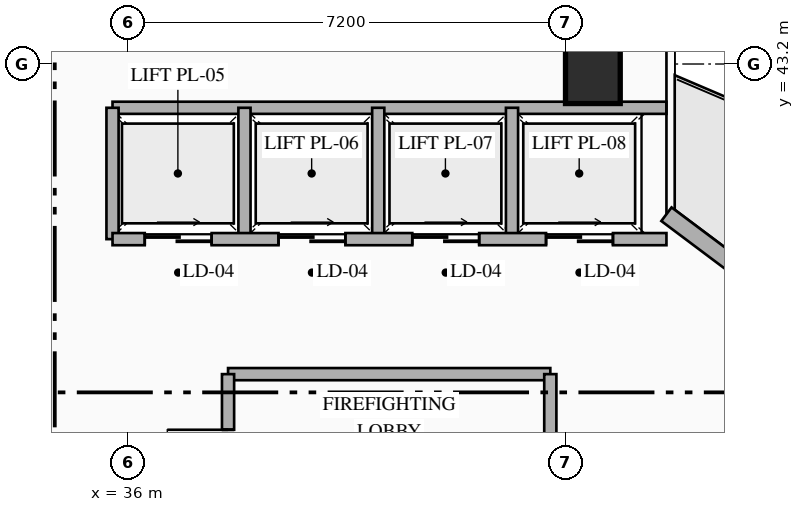
"""IFC4 building model, lengths in metres.
Left out: names, types, materials, properties, quantities, classifications, styles, units other than length and angle.
Written with IfcOpenShell. Run it as: python <this file> out.ifc"""

import sys

from ifc_helpers import new_model, si_unit, direction, frame, frame_2d, origin, origin_2d, place, context, subcontext, project, spatial, rectangle, extrude, element, fill, save


model = new_model("IFC4")
c1 = context("Model", 3, precision=1e-05, world=origin(), true_north=direction((0.0, 1.0)))
c2 = subcontext(c1, "Body", "Model", "MODEL_VIEW")
j1 = project(units=[si_unit("LENGTHUNIT", "METRE"), si_unit("PLANEANGLEUNIT", "RADIAN")], contexts=[c1])
p1 = place(None, origin())
s1 = spatial("IfcSite", under=j1, at=p1, CompositionType="ELEMENT")
p2 = place(p1, origin())
s2 = spatial("IfcBuilding", under=s1, at=p2, CompositionType="ELEMENT")
p3 = place(p2, frame((0.0, 0.0, 130.05)))
s3 = spatial("IfcBuildingStorey", under=s2, at=p3, CompositionType="ELEMENT", Elevation=130.05)
p4 = place(p3, frame((43.65, 43.0, 0.0), z_axis=(0.0, 0.0, 1.0), x_axis=(1.0, 0.0, 0.0)))
e1 = element("IfcColumn", 1, at=p4, inside=s3, PredefinedType="COLUMN", context=c2, shape_type="SweptSolid", body=[
    extrude(rectangle(XDim=0.9, YDim=0.9, at=origin_2d()), origin(), (0.0, 0.0, 1.0), 4.8),
])
p5 = place(p3, frame((44.86, 40.73, 0.0), z_axis=(0.0, 0.0, 1.0), x_axis=(0.800007624502, -0.599989833863, 0.0)))
e2 = element("IfcWall", 2, at=p5, inside=s3, PredefinedType="STANDARD", context=c2, shape_type="SweptSolid", body=[
    extrude(rectangle(XDim=19.212, YDim=0.28, at=frame_2d((9.606, 0.0))), origin(), (0.0, 0.0, 1.0), 4.55),
])
p6 = place(p5, frame((1.755, 0.0, 0.0)))
e3 = element("IfcOpeningElement", 3, at=p6, cuts=e2, PredefinedType="OPENING", context=c2, shape_type="SweptSolid", body=[
    extrude(rectangle(XDim=1.1, YDim=2.2, at=frame_2d((0.55, 1.1))), frame((0.0, 0.15, 0.0), z_axis=(0.0, -1.0, 0.0), x_axis=(1.0, 0.0, 0.0)), (0.0, 0.0, 1.0), 0.3),
])
p7 = place(p5, frame((13.509, 0.0, 0.85)))
e4 = element("IfcOpeningElement", 4, at=p7, cuts=e2, PredefinedType="OPENING", context=c2, shape_type="SweptSolid", body=[
    extrude(rectangle(XDim=1.8, YDim=2.1, at=frame_2d((0.9, 1.05))), frame((0.0, 0.15, 0.0), z_axis=(0.0, -1.0, 0.0), x_axis=(1.0, 0.0, 0.0)), (0.0, 0.0, 1.0), 0.3),
])
p8 = place(p3, frame((37.65, 38.1, 0.0), z_axis=(0.0, 0.0, 1.0), x_axis=(1.0, 0.0, 0.0)))
e5 = element("IfcWall", 5, at=p8, inside=s3, PredefinedType="STANDARD", context=c2, shape_type="SweptSolid", body=[
    extrude(rectangle(XDim=5.3, YDim=0.2, at=frame_2d((2.65, 0.0))), origin(), (0.0, 0.0, 1.0), 4.55),
])
p9 = place(p3, frame((42.95, 35.27, 0.0), z_axis=(0.0, 0.0, 1.0), x_axis=(0.0, 1.0, 0.0)))
e6 = element("IfcWall", 6, at=p9, inside=s3, PredefinedType="STANDARD", context=c2, shape_type="SweptSolid", body=[
    extrude(rectangle(XDim=2.83, YDim=0.2, at=frame_2d((1.415, 0.0))), origin(), (0.0, 0.0, 1.0), 4.55),
])
p10 = place(p3, frame((37.65, 35.27, 0.0), z_axis=(0.0, 0.0, 1.0), x_axis=(0.0, 1.0, 0.0)))
e7 = element("IfcWall", 7, at=p10, inside=s3, PredefinedType="STANDARD", context=c2, shape_type="SweptSolid", body=[
    extrude(rectangle(XDim=2.83, YDim=0.2, at=frame_2d((1.415, 0.0))), origin(), (0.0, 0.0, 1.0), 4.55),
])
p11 = place(p10, frame((0.915, 0.0, 0.0)))
e8 = element("IfcOpeningElement", 8, at=p11, cuts=e7, PredefinedType="OPENING", context=c2, shape_type="SweptSolid", body=[
    extrude(rectangle(XDim=1.0, YDim=2.2, at=frame_2d((0.5, 1.1))), frame((0.0, 0.11, 0.0), z_axis=(0.0, -1.0, 0.0), x_axis=(1.0, 0.0, 0.0)), (0.0, 0.0, 1.0), 0.22),
])
p12 = place(p3, frame((35.75, 42.48, 0.0), z_axis=(0.0, 0.0, 1.0), x_axis=(1.0, 0.0, 0.0)))
e9 = element("IfcWall", 9, at=p12, inside=s3, PredefinedType="STANDARD", context=c2, shape_type="SweptSolid", body=[
    extrude(rectangle(XDim=9.11, YDim=0.2, at=frame_2d((4.555, 0.0))), origin(), (0.0, 0.0, 1.0), 4.55),
])
for number, where, z_axis, x_axis in (
    (10, (35.75, 40.32, 0.0), (0.0, 0.0, 1.0), (0.0, 1.0, 0.0)),
    (11, (37.92, 40.32, 0.0), (0.0, 0.0, 1.0), (0.0, 1.0, 0.0)),
    (12, (40.12, 40.32, 0.0), (0.0, 0.0, 1.0), (0.0, 1.0, 0.0)),
    (13, (42.32, 40.32, 0.0), (0.0, 0.0, 1.0), (0.0, 1.0, 0.0)),
):
    element("IfcWall", number, at=place(p3, frame(where, z_axis=z_axis, x_axis=x_axis)), inside=s3, PredefinedType="STANDARD", context=c2, shape_type="SweptSolid", body=[
        extrude(rectangle(XDim=2.16, YDim=0.2, at=frame_2d((1.08, 0.0))), origin(), (0.0, 0.0, 1.0), 4.55),
    ])
p13 = place(p3, frame((35.75, 40.32, 0.0), z_axis=(0.0, 0.0, 1.0), x_axis=(1.0, 0.0, 0.0)))
e14 = element("IfcWall", 14, at=p13, inside=s3, PredefinedType="STANDARD", context=c2, shape_type="SweptSolid", body=[
    extrude(rectangle(XDim=9.11, YDim=0.2, at=frame_2d((4.555, 0.0))), origin(), (0.0, 0.0, 1.0), 4.55),
])
p14 = place(p13, frame((0.53, 0.0, 0.0)))
e15 = element("IfcOpeningElement", 15, at=p14, cuts=e14, PredefinedType="OPENING", context=c2, shape_type="SweptSolid", body=[
    extrude(rectangle(XDim=1.1, YDim=2.18, at=frame_2d((0.55, 1.09))), frame((0.0, 0.11, 0.0), z_axis=(0.0, -1.0, 0.0), x_axis=(1.0, 0.0, 0.0)), (0.0, 0.0, 1.0), 0.22),
])
p15 = place(p13, frame((2.73, 0.0, 0.0)))
e16 = element("IfcOpeningElement", 16, at=p15, cuts=e14, PredefinedType="OPENING", context=c2, shape_type="SweptSolid", body=[
    extrude(rectangle(XDim=1.1, YDim=2.18, at=frame_2d((0.55, 1.09))), frame((0.0, 0.11, 0.0), z_axis=(0.0, -1.0, 0.0), x_axis=(1.0, 0.0, 0.0)), (0.0, 0.0, 1.0), 0.22),
])
p16 = place(p13, frame((4.93, 0.0, 0.0)))
e17 = element("IfcOpeningElement", 17, at=p16, cuts=e14, PredefinedType="OPENING", context=c2, shape_type="SweptSolid", body=[
    extrude(rectangle(XDim=1.1, YDim=2.18, at=frame_2d((0.55, 1.09))), frame((0.0, 0.11, 0.0), z_axis=(0.0, -1.0, 0.0), x_axis=(1.0, 0.0, 0.0)), (0.0, 0.0, 1.0), 0.22),
])
p17 = place(p13, frame((7.13, 0.0, 0.0)))
e18 = element("IfcOpeningElement", 18, at=p17, cuts=e14, PredefinedType="OPENING", context=c2, shape_type="SweptSolid", body=[
    extrude(rectangle(XDim=1.1, YDim=2.18, at=frame_2d((0.55, 1.09))), frame((0.0, 0.11, 0.0), z_axis=(0.0, -1.0, 0.0), x_axis=(1.0, 0.0, 0.0)), (0.0, 0.0, 1.0), 0.22),
])
p18 = place(p3, frame((43.63, 31.973, 0.0), z_axis=(0.0, 0.0, 1.0), x_axis=(0.599975099311, 0.800018674911, 0.0)))
e19 = element("IfcWall", 19, at=p18, inside=s3, PredefinedType="PARTITIONING", context=c2, shape_type="SweptSolid", body=[
    extrude(rectangle(XDim=7.844, YDim=0.15, at=frame_2d((3.922, 0.0))), origin(), (0.0, 0.0, 1.0), 4.55),
])
p19 = place(p11, origin())
e20 = element("IfcDoor", 20, at=p19, inside=s3, OperationType="SINGLE_SWING_RIGHT", PredefinedType="DOOR", context=c2, shape_type="SweptSolid", body=[
    extrude(rectangle(XDim=1.0, YDim=2.2, at=frame_2d((0.5, 1.1))), frame((0.0, 0.025, 0.0), z_axis=(0.0, -1.0, 0.0), x_axis=(1.0, 0.0, 0.0)), (0.0, 0.0, 1.0), 0.05),
])
fill(e8, e20)
p20 = place(p14, origin())
e21 = element("IfcDoor", 21, at=p20, inside=s3, OperationType="SLIDING_TO_RIGHT", PredefinedType="USERDEFINED", context=c2, shape_type="SweptSolid", body=[
    extrude(rectangle(XDim=1.1, YDim=2.18, at=frame_2d((0.55, 1.09))), frame((0.0, 0.025, 0.0), z_axis=(0.0, -1.0, 0.0), x_axis=(1.0, 0.0, 0.0)), (0.0, 0.0, 1.0), 0.05),
])
fill(e15, e21)
p21 = place(p15, origin())
e22 = element("IfcDoor", 22, at=p21, inside=s3, OperationType="SLIDING_TO_RIGHT", PredefinedType="USERDEFINED", context=c2, shape_type="SweptSolid", body=[
    extrude(rectangle(XDim=1.1, YDim=2.18, at=frame_2d((0.55, 1.09))), frame((0.0, 0.025, 0.0), z_axis=(0.0, -1.0, 0.0), x_axis=(1.0, 0.0, 0.0)), (0.0, 0.0, 1.0), 0.05),
])
fill(e16, e22)
p22 = place(p16, origin())
e23 = element("IfcDoor", 23, at=p22, inside=s3, OperationType="SLIDING_TO_RIGHT", PredefinedType="USERDEFINED", context=c2, shape_type="SweptSolid", body=[
    extrude(rectangle(XDim=1.1, YDim=2.18, at=frame_2d((0.55, 1.09))), frame((0.0, 0.025, 0.0), z_axis=(0.0, -1.0, 0.0), x_axis=(1.0, 0.0, 0.0)), (0.0, 0.0, 1.0), 0.05),
])
fill(e17, e23)
p23 = place(p17, origin())
e24 = element("IfcDoor", 24, at=p23, inside=s3, OperationType="SLIDING_TO_RIGHT", PredefinedType="USERDEFINED", context=c2, shape_type="SweptSolid", body=[
    extrude(rectangle(XDim=1.1, YDim=2.18, at=frame_2d((0.55, 1.09))), frame((0.0, 0.025, 0.0), z_axis=(0.0, -1.0, 0.0), x_axis=(1.0, 0.0, 0.0)), (0.0, 0.0, 1.0), 0.05),
])
fill(e18, e24)
save(model, sys.argv[1])
